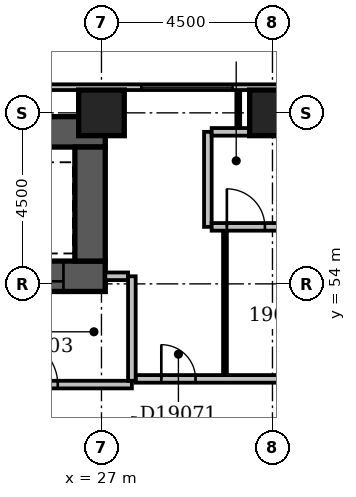
"""IFC4 building model, lengths in metres.
Left out: names, types, materials, properties, quantities, classifications, styles, units other than length and angle.
Written with IfcOpenShell. Run it as: python <this file> out.ifc"""

import sys

from ifc_helpers import new_model, si_unit, direction, frame, frame_2d, origin, origin_2d, place, context, subcontext, project, spatial, rectangle, extrude, element, fill, save


model = new_model("IFC4")
c1 = context("Model", 3, precision=1e-05, world=origin(), true_north=direction((0.0, 1.0)))
c2 = subcontext(c1, "Body", "Model", "MODEL_VIEW")
j1 = project(units=[si_unit("LENGTHUNIT", "METRE"), si_unit("PLANEANGLEUNIT", "RADIAN")], contexts=[c1])
p1 = place(None, origin())
s1 = spatial("IfcSite", under=j1, at=p1, CompositionType="ELEMENT")
p2 = place(p1, origin())
s2 = spatial("IfcBuilding", under=s1, at=p2, CompositionType="ELEMENT")
p3 = place(p2, frame((0.0, 0.0, 79.4)))
s3 = spatial("IfcBuildingStorey", under=s2, at=p3, CompositionType="ELEMENT", Elevation=79.4)
p4 = place(p3, frame((23.8, 54.2, -0.3), z_axis=(0.0, 0.0, 1.0), x_axis=(1.0, 0.0, 0.0)))
e1 = element("IfcWall", 1, at=p4, inside=s3, PredefinedType="SHEAR", context=c2, shape_type="SweptSolid", body=[
    extrude(rectangle(XDim=3.3, YDim=0.8, at=frame_2d((1.65, 0.0))), origin(), (0.0, 0.0, 1.0), 3.6),
])
p5 = place(p4, frame((1.1, 0.0, 0.3)))
e2 = element("IfcOpeningElement", 2, at=p5, cuts=e1, PredefinedType="OPENING", context=c2, shape_type="SweptSolid", body=[
    extrude(rectangle(XDim=1.1, YDim=2.1, at=frame_2d((0.55, 1.05))), frame((0.0, 0.412, 0.0), z_axis=(0.0, -1.0, 0.0), x_axis=(1.0, 0.0, 0.0)), (0.0, 0.0, 1.0), 0.824),
])
p6 = place(p3, frame((23.8, 58.0, -0.3), z_axis=(0.0, 0.0, 1.0), x_axis=(1.0, 0.0, 0.0)))
e3 = element("IfcWall", 3, at=p6, inside=s3, PredefinedType="SHEAR", context=c2, shape_type="SweptSolid", body=[
    extrude(rectangle(XDim=3.3, YDim=0.8, at=frame_2d((1.65, 0.0))), origin(), (0.0, 0.0, 1.0), 3.6),
])
p7 = place(p3, frame((26.7, 54.6, -0.3), z_axis=(0.0, 0.0, 1.0), x_axis=(0.0, 1.0, 0.0)))
e4 = element("IfcWall", 4, at=p7, inside=s3, PredefinedType="SHEAR", context=c2, shape_type="SweptSolid", body=[
    extrude(rectangle(XDim=3.0, YDim=0.8, at=frame_2d((1.5, 0.0))), origin(), (0.0, 0.0, 1.0), 3.6),
])
for number, where, z_axis, x_axis in (
    (5, (27.0, 58.5, -0.3), (0.0, 0.0, 1.0), (1.0, 0.0, 0.0)),
    (6, (31.5, 58.5, -0.3), (0.0, 0.0, 1.0), (1.0, 0.0, 0.0)),
):
    element("IfcColumn", number, at=place(p3, frame(where, z_axis=z_axis, x_axis=x_axis)), inside=s3, PredefinedType="COLUMN", context=c2, shape_type="SweptSolid", body=[
        extrude(rectangle(XDim=1.2, YDim=1.2, at=origin_2d()), origin(), (0.0, 0.0, 1.0), 3.6),
    ])
p8 = place(p3, frame((68.1, 59.175, 0.0), z_axis=(0.0, 0.0, 1.0), x_axis=(-1.0, 0.0, 0.0)))
e7 = element("IfcWall", 7, at=p8, inside=s3, PredefinedType="STANDARD", context=c2, shape_type="SweptSolid", body=[
    extrude(rectangle(XDim=68.85, YDim=0.15, at=frame_2d((34.425, 0.0))), origin(), (0.0, 0.0, 1.0), 2.7),
])
p9 = place(p8, frame((1.65, 0.0, 0.6)))
e8 = element("IfcOpeningElement", 8, at=p9, cuts=e7, PredefinedType="OPENING", context=c2, shape_type="SweptSolid", body=[
    extrude(rectangle(XDim=2.4, YDim=1.8, at=frame_2d((1.2, 0.9))), frame((0.0, 0.087, 0.0), z_axis=(0.0, -1.0, 0.0), x_axis=(1.0, 0.0, 0.0)), (0.0, 0.0, 1.0), 0.174),
])
p10 = place(p8, frame((5.903, 0.0, 0.6)))
e9 = element("IfcOpeningElement", 9, at=p10, cuts=e7, PredefinedType="OPENING", context=c2, shape_type="SweptSolid", body=[
    extrude(rectangle(XDim=1.5, YDim=1.8, at=frame_2d((0.75, 0.9))), frame((0.0, 0.087, 0.0), z_axis=(0.0, -1.0, 0.0), x_axis=(1.0, 0.0, 0.0)), (0.0, 0.0, 1.0), 0.174),
])
p11 = place(p8, frame((37.65, 0.0, 0.6)))
e10 = element("IfcOpeningElement", 10, at=p11, cuts=e7, PredefinedType="OPENING", context=c2, shape_type="SweptSolid", body=[
    extrude(rectangle(XDim=2.4, YDim=1.8, at=frame_2d((1.2, 0.9))), frame((0.0, 0.087, 0.0), z_axis=(0.0, -1.0, 0.0), x_axis=(1.0, 0.0, 0.0)), (0.0, 0.0, 1.0), 0.174),
])
p12 = place(p3, frame((23.0, 51.35, 0.0), z_axis=(0.0, 0.0, 1.0), x_axis=(1.0, 0.0, 0.0)))
e11 = element("IfcWall", 11, at=p12, inside=s3, PredefinedType="PARTITIONING", context=c2, shape_type="SweptSolid", body=[
    extrude(rectangle(XDim=4.8, YDim=0.2, at=frame_2d((2.4, 0.0))), origin(), (0.0, 0.0, 1.0), 3.3),
])
p13 = place(p12, frame((1.65, 0.0, 0.0)))
e12 = element("IfcOpeningElement", 12, at=p13, cuts=e11, PredefinedType="OPENING", context=c2, shape_type="SweptSolid", body=[
    extrude(rectangle(XDim=1.2, YDim=2.1, at=frame_2d((0.6, 1.05))), frame((0.0, 0.112, 0.0), z_axis=(0.0, -1.0, 0.0), x_axis=(1.0, 0.0, 0.0)), (0.0, 0.0, 1.0), 0.224),
])
p14 = place(p3, frame((27.8, 51.45, 0.0), z_axis=(0.0, 0.0, 1.0), x_axis=(0.0, 1.0, 0.0)))
e13 = element("IfcWall", 13, at=p14, inside=s3, PredefinedType="PARTITIONING", context=c2, shape_type="SweptSolid", body=[
    extrude(rectangle(XDim=2.75, YDim=0.2, at=frame_2d((1.375, 0.0))), origin(), (0.0, 0.0, 1.0), 3.3),
])
p15 = place(p3, frame((27.1, 54.2, 0.0), z_axis=(0.0, 0.0, 1.0), x_axis=(1.0, 0.0, 0.0)))
e14 = element("IfcWall", 14, at=p15, inside=s3, PredefinedType="PARTITIONING", context=c2, shape_type="SweptSolid", body=[
    extrude(rectangle(XDim=0.6, YDim=0.2, at=frame_2d((0.3, 0.0))), origin(), (0.0, 0.0, 1.0), 3.3),
])
p16 = place(p3, frame((27.9, 51.5, 0.0), z_axis=(0.0, 0.0, 1.0), x_axis=(1.0, 0.0, 0.0)))
e15 = element("IfcWall", 15, at=p16, inside=s3, PredefinedType="PARTITIONING", context=c2, shape_type="SweptSolid", body=[
    extrude(rectangle(XDim=9.3, YDim=0.2, at=frame_2d((4.65, 0.0))), origin(), (0.0, 0.0, 1.0), 3.3),
])
p17 = place(p16, frame((0.675, 0.0, 0.0)))
e16 = element("IfcOpeningElement", 16, at=p17, cuts=e15, PredefinedType="OPENING", context=c2, shape_type="SweptSolid", body=[
    extrude(rectangle(XDim=0.9, YDim=2.1, at=frame_2d((0.45, 1.05))), frame((0.0, 0.112, 0.0), z_axis=(0.0, -1.0, 0.0), x_axis=(1.0, 0.0, 0.0)), (0.0, 0.0, 1.0), 0.224),
])
p18 = place(p16, frame((5.375, 0.0, 0.0)))
e17 = element("IfcOpeningElement", 17, at=p18, cuts=e15, PredefinedType="OPENING", context=c2, shape_type="SweptSolid", body=[
    extrude(rectangle(XDim=1.0, YDim=2.1, at=frame_2d((0.5, 1.05))), frame((0.0, 0.112, 0.0), z_axis=(0.0, -1.0, 0.0), x_axis=(1.0, 0.0, 0.0)), (0.0, 0.0, 1.0), 0.224),
])
p19 = place(p3, frame((30.25, 51.6, 0.0), z_axis=(0.0, 0.0, 1.0), x_axis=(0.0, 1.0, 0.0)))
e18 = element("IfcWall", 18, at=p19, inside=s3, PredefinedType="PARTITIONING", context=c2, shape_type="SweptSolid", body=[
    extrude(rectangle(XDim=3.8, YDim=0.1, at=frame_2d((1.9, 0.0))), origin(), (0.0, 0.0, 1.0), 3.3),
])
p20 = place(p3, frame((29.8, 55.5, 0.0), z_axis=(0.0, 0.0, 1.0), x_axis=(0.0, 1.0, 0.0)))
e19 = element("IfcWall", 19, at=p20, inside=s3, PredefinedType="PARTITIONING", context=c2, shape_type="SweptSolid", body=[
    extrude(rectangle(XDim=2.5, YDim=0.2, at=frame_2d((1.25, 0.0))), origin(), (0.0, 0.0, 1.0), 3.3),
])
p21 = place(p3, frame((29.9, 55.5, 0.0), z_axis=(0.0, 0.0, 1.0), x_axis=(1.0, 0.0, 0.0)))
e20 = element("IfcWall", 20, at=p21, inside=s3, PredefinedType="PARTITIONING", context=c2, shape_type="SweptSolid", body=[
    extrude(rectangle(XDim=1.8, YDim=0.2, at=frame_2d((0.9, 0.0))), origin(), (0.0, 0.0, 1.0), 3.3),
])
p22 = place(p21, frame((0.4, 0.0, 0.0)))
e21 = element("IfcOpeningElement", 21, at=p22, cuts=e20, PredefinedType="OPENING", context=c2, shape_type="SweptSolid", body=[
    extrude(rectangle(XDim=1.0, YDim=2.1, at=frame_2d((0.5, 1.05))), frame((0.0, 0.112, 0.0), z_axis=(0.0, -1.0, 0.0), x_axis=(1.0, 0.0, 0.0)), (0.0, 0.0, 1.0), 0.224),
])
p23 = place(p3, frame((29.9, 58.0, 0.0), z_axis=(0.0, 0.0, 1.0), x_axis=(1.0, 0.0, 0.0)))
e22 = element("IfcWall", 22, at=p23, inside=s3, PredefinedType="PARTITIONING", context=c2, shape_type="SweptSolid", body=[
    extrude(rectangle(XDim=1.8, YDim=0.2, at=frame_2d((0.9, 0.0))), origin(), (0.0, 0.0, 1.0), 3.3),
])
p24 = place(p3, frame((30.6, 58.1, 0.0), z_axis=(0.0, 0.0, 1.0), x_axis=(0.0, 1.0, 0.0)))
e23 = element("IfcWall", 23, at=p24, inside=s3, PredefinedType="PARTITIONING", context=c2, shape_type="SweptSolid", body=[
    extrude(rectangle(XDim=1.0, YDim=0.1, at=frame_2d((0.5, 0.0))), origin(), (0.0, 0.0, 1.0), 3.3),
])
p25 = place(p11, origin())
e24 = element("IfcWindow", 24, at=p25, inside=s3, PartitioningType="SINGLE_PANEL", PredefinedType="WINDOW", context=c2, shape_type="SweptSolid", body=[
    extrude(rectangle(XDim=2.4, YDim=1.8, at=frame_2d((1.2, 0.9))), frame((0.0, 0.03, 0.0), z_axis=(0.0, -1.0, 0.0), x_axis=(1.0, 0.0, 0.0)), (0.0, 0.0, 1.0), 0.06),
])
fill(e10, e24)
p26 = place(p13, origin())
e25 = element("IfcDoor", 25, at=p26, inside=s3, OperationType="SINGLE_SWING_LEFT", PredefinedType="DOOR", context=c2, shape_type="SweptSolid", body=[
    extrude(rectangle(XDim=1.2, YDim=2.1, at=frame_2d((0.6, 1.05))), frame((0.0, 0.025, 0.0), z_axis=(0.0, -1.0, 0.0), x_axis=(1.0, 0.0, 0.0)), (0.0, 0.0, 1.0), 0.05),
])
fill(e12, e25)
p27 = place(p5, origin())
e26 = element("IfcDoor", 26, at=p27, inside=s3, OperationType="SLIDING_TO_LEFT", PredefinedType="DOOR", context=c2, shape_type="SweptSolid", body=[
    extrude(rectangle(XDim=1.1, YDim=2.1, at=frame_2d((0.55, 1.05))), frame((0.0, 0.025, 0.0), z_axis=(0.0, -1.0, 0.0), x_axis=(1.0, 0.0, 0.0)), (0.0, 0.0, 1.0), 0.05),
])
fill(e2, e26)
p28 = place(p17, origin())
e27 = element("IfcDoor", 27, at=p28, inside=s3, OperationType="SINGLE_SWING_LEFT", PredefinedType="DOOR", context=c2, shape_type="SweptSolid", body=[
    extrude(rectangle(XDim=0.9, YDim=2.1, at=frame_2d((0.45, 1.05))), frame((0.0, 0.025, 0.0), z_axis=(0.0, -1.0, 0.0), x_axis=(1.0, 0.0, 0.0)), (0.0, 0.0, 1.0), 0.05),
])
fill(e16, e27)
p29 = place(p22, origin())
e28 = element("IfcDoor", 28, at=p29, inside=s3, OperationType="SINGLE_SWING_LEFT", PredefinedType="DOOR", context=c2, shape_type="SweptSolid", body=[
    extrude(rectangle(XDim=1.0, YDim=2.1, at=frame_2d((0.5, 1.05))), frame((0.0, 0.025, 0.0), z_axis=(0.0, -1.0, 0.0), x_axis=(1.0, 0.0, 0.0)), (0.0, 0.0, 1.0), 0.05),
])
fill(e21, e28)
save(model, sys.argv[1])
